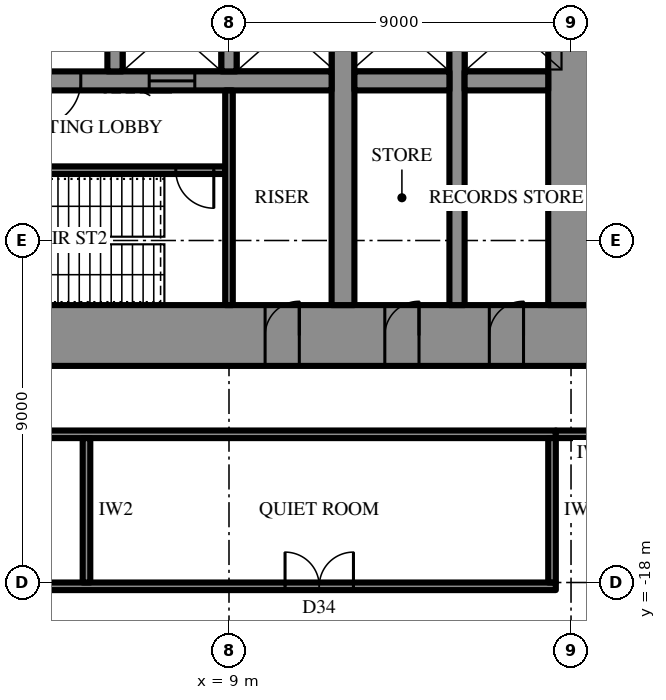
"""IFC4 building model, lengths in metres.
Left out: names, types, materials, properties, quantities, classifications, styles, units other than length and angle.
Written with IfcOpenShell. Run it as: python <this file> out.ifc"""

import sys

from ifc_helpers import new_model, si_unit, direction, frame, frame_2d, origin, place, context, subcontext, project, spatial, rectangle, extrude, element, fill, save


model = new_model("IFC4")
c1 = context("Model", 3, precision=1e-05, world=origin(), true_north=direction((0.0, 1.0)))
c2 = subcontext(c1, "Body", "Model", "MODEL_VIEW")
j1 = project(units=[si_unit("LENGTHUNIT", "METRE"), si_unit("PLANEANGLEUNIT", "RADIAN")], contexts=[c1])
p1 = place(None, origin())
s1 = spatial("IfcSite", under=j1, at=p1, CompositionType="ELEMENT")
p2 = place(p1, origin())
s2 = spatial("IfcBuilding", under=s1, at=p2, CompositionType="ELEMENT")
p3 = place(p2, frame((0.0, 0.0, 27.7)))
s3 = spatial("IfcBuildingStorey", under=s2, at=p3, CompositionType="ELEMENT", Elevation=27.7)
p4 = place(p3, frame((18.6, -11.5, 0.0), z_axis=(0.0, 0.0, 1.0), x_axis=(-1.0, 0.0, 0.0)))
e1 = element("IfcWall", 1, at=p4, inside=s3, PredefinedType="SHEAR", context=c2, shape_type="SweptSolid", body=[
    extrude(rectangle(XDim=37.2, YDim=1.6, at=frame_2d((18.6, 0.0))), origin(), (0.0, 0.0, 1.0), 4.2),
])
p5 = place(p4, frame((19.45, 0.0, 0.0)))
e2 = element("IfcOpeningElement", 2, at=p5, cuts=e1, PredefinedType="OPENING", context=c2, shape_type="SweptSolid", body=[
    extrude(rectangle(XDim=0.9, YDim=2.2, at=frame_2d((0.45, 1.1))), frame((0.0, 0.81, 0.0), z_axis=(0.0, -1.0, 0.0), x_axis=(1.0, 0.0, 0.0)), (0.0, 0.0, 1.0), 1.62),
])
p6 = place(p4, frame((22.45, 0.0, 0.0)))
e3 = element("IfcOpeningElement", 3, at=p6, cuts=e1, PredefinedType="OPENING", context=c2, shape_type="SweptSolid", body=[
    extrude(rectangle(XDim=0.9, YDim=2.2, at=frame_2d((0.45, 1.1))), frame((0.0, 0.81, 0.0), z_axis=(0.0, -1.0, 0.0), x_axis=(1.0, 0.0, 0.0)), (0.0, 0.0, 1.0), 1.62),
])
p7 = place(p4, frame((25.5, 0.0, 0.0)))
e4 = element("IfcOpeningElement", 4, at=p7, cuts=e1, PredefinedType="OPENING", context=c2, shape_type="SweptSolid", body=[
    extrude(rectangle(XDim=1.0, YDim=2.2, at=frame_2d((0.5, 1.1))), frame((0.0, 0.81, 0.0), z_axis=(0.0, -1.0, 0.0), x_axis=(1.0, 0.0, 0.0)), (0.0, 0.0, 1.0), 1.62),
])
p8 = place(p4, frame((1.85, 0.0, 0.0)))
e5 = element("IfcOpeningElement", 5, at=p8, cuts=e1, PredefinedType="OPENING", context=c2, shape_type="SweptSolid", body=[
    extrude(rectangle(XDim=0.9, YDim=2.2, at=frame_2d((0.45, 1.1))), frame((0.0, 0.81, 0.0), z_axis=(0.0, -1.0, 0.0), x_axis=(1.0, 0.0, 0.0)), (0.0, 0.0, 1.0), 1.62),
])
p9 = place(p4, frame((4.6, 0.0, 0.0)))
e6 = element("IfcOpeningElement", 6, at=p9, cuts=e1, PredefinedType="OPENING", context=c2, shape_type="SweptSolid", body=[
    extrude(rectangle(XDim=0.9, YDim=2.2, at=frame_2d((0.45, 1.1))), frame((0.0, 0.81, 0.0), z_axis=(0.0, -1.0, 0.0), x_axis=(1.0, 0.0, 0.0)), (0.0, 0.0, 1.0), 1.62),
])
p10 = place(p4, frame((7.75, 0.0, 0.0)))
e7 = element("IfcOpeningElement", 7, at=p10, cuts=e1, PredefinedType="OPENING", context=c2, shape_type="SweptSolid", body=[
    extrude(rectangle(XDim=0.9, YDim=2.2, at=frame_2d((0.45, 1.1))), frame((0.0, 0.81, 0.0), z_axis=(0.0, -1.0, 0.0), x_axis=(1.0, 0.0, 0.0)), (0.0, 0.0, 1.0), 1.62),
])
p11 = place(p4, frame((28.55, 0.0, 0.0)))
e8 = element("IfcOpeningElement", 8, at=p11, cuts=e1, PredefinedType="OPENING", context=c2, shape_type="SweptSolid", body=[
    extrude(rectangle(XDim=0.9, YDim=2.2, at=frame_2d((0.45, 1.1))), frame((0.0, 0.81, 0.0), z_axis=(0.0, -1.0, 0.0), x_axis=(1.0, 0.0, 0.0)), (0.0, 0.0, 1.0), 1.62),
])
p12 = place(p4, frame((31.7, 0.0, 0.0)))
e9 = element("IfcOpeningElement", 9, at=p12, cuts=e1, PredefinedType="OPENING", context=c2, shape_type="SweptSolid", body=[
    extrude(rectangle(XDim=0.9, YDim=2.2, at=frame_2d((0.45, 1.1))), frame((0.0, 0.81, 0.0), z_axis=(0.0, -1.0, 0.0), x_axis=(1.0, 0.0, 0.0)), (0.0, 0.0, 1.0), 1.62),
])
p13 = place(p4, frame((34.45, 0.0, 0.0)))
e10 = element("IfcOpeningElement", 10, at=p13, cuts=e1, PredefinedType="OPENING", context=c2, shape_type="SweptSolid", body=[
    extrude(rectangle(XDim=0.9, YDim=2.2, at=frame_2d((0.45, 1.1))), frame((0.0, 0.81, 0.0), z_axis=(0.0, -1.0, 0.0), x_axis=(1.0, 0.0, 0.0)), (0.0, 0.0, 1.0), 1.62),
])
p14 = place(p3, frame((18.0, -10.7, 0.0), z_axis=(0.0, 0.0, 1.0), x_axis=(0.0, 1.0, 0.0)))
e11 = element("IfcWall", 11, at=p14, inside=s3, PredefinedType="SHEAR", context=c2, shape_type="SweptSolid", body=[
    extrude(rectangle(XDim=21.4, YDim=1.2, at=frame_2d((10.7, 0.0))), origin(), (0.0, 0.0, 1.0), 4.2),
])
p15 = place(p14, frame((9.8, 0.0, 0.0)))
e12 = element("IfcOpeningElement", 12, at=p15, cuts=e11, PredefinedType="OPENING", context=c2, shape_type="SweptSolid", body=[
    extrude(rectangle(XDim=1.8, YDim=2.4, at=frame_2d((0.9, 1.2))), frame((0.0, 0.61, 0.0), z_axis=(0.0, -1.0, 0.0), x_axis=(1.0, 0.0, 0.0)), (0.0, 0.0, 1.0), 1.22),
])
p16 = place(p3, frame((12.0, -10.7, 0.0), z_axis=(0.0, 0.0, 1.0), x_axis=(0.0, 1.0, 0.0)))
e13 = element("IfcWall", 13, at=p16, inside=s3, PredefinedType="SHEAR", context=c2, shape_type="SweptSolid", body=[
    extrude(rectangle(XDim=21.4, YDim=0.6, at=frame_2d((10.7, 0.0))), origin(), (0.0, 0.0, 1.0), 4.2),
])
p17 = place(p16, frame((9.8, 0.0, 0.0)))
e14 = element("IfcOpeningElement", 14, at=p17, cuts=e13, PredefinedType="OPENING", context=c2, shape_type="SweptSolid", body=[
    extrude(rectangle(XDim=1.8, YDim=2.4, at=frame_2d((0.9, 1.2))), frame((0.0, 0.31, 0.0), z_axis=(0.0, -1.0, 0.0), x_axis=(1.0, 0.0, 0.0)), (0.0, 0.0, 1.0), 0.62),
])
p18 = place(p3, frame((15.0, -10.7, 0.0), z_axis=(0.0, 0.0, 1.0), x_axis=(0.0, 1.0, 0.0)))
e15 = element("IfcWall", 15, at=p18, inside=s3, PredefinedType="SHEAR", context=c2, shape_type="SweptSolid", body=[
    extrude(rectangle(XDim=21.4, YDim=0.4, at=frame_2d((10.7, 0.0))), origin(), (0.0, 0.0, 1.0), 4.2),
])
p19 = place(p18, frame((9.8, 0.0, 0.0)))
e16 = element("IfcOpeningElement", 16, at=p19, cuts=e15, PredefinedType="OPENING", context=c2, shape_type="SweptSolid", body=[
    extrude(rectangle(XDim=1.8, YDim=2.4, at=frame_2d((0.9, 1.2))), frame((0.0, 0.21, 0.0), z_axis=(0.0, -1.0, 0.0), x_axis=(1.0, 0.0, 0.0)), (0.0, 0.0, 1.0), 0.42),
])
p20 = place(p3, frame((17.4, -4.8, 0.0), z_axis=(0.0, 0.0, 1.0), x_axis=(-1.0, 0.0, 0.0)))
e17 = element("IfcWall", 17, at=p20, inside=s3, PredefinedType="SHEAR", context=c2, shape_type="SweptSolid", body=[
    extrude(rectangle(XDim=2.2, YDim=0.5, at=frame_2d((1.1, 0.0))), origin(), (0.0, 0.0, 1.0), 4.2),
])
p21 = place(p3, frame((14.8, -4.8, 0.0), z_axis=(0.0, 0.0, 1.0), x_axis=(-1.0, 0.0, 0.0)))
e18 = element("IfcWall", 18, at=p21, inside=s3, PredefinedType="SHEAR", context=c2, shape_type="SweptSolid", body=[
    extrude(rectangle(XDim=2.5, YDim=0.5, at=frame_2d((1.25, 0.0))), origin(), (0.0, 0.0, 1.0), 4.2),
])
p22 = place(p3, frame((11.7, -4.8, 0.0), z_axis=(0.0, 0.0, 1.0), x_axis=(-1.0, 0.0, 0.0)))
e19 = element("IfcWall", 19, at=p22, inside=s3, PredefinedType="SHEAR", context=c2, shape_type="SweptSolid", body=[
    extrude(rectangle(XDim=23.4, YDim=0.5, at=frame_2d((11.7, 0.0))), origin(), (0.0, 0.0, 1.0), 4.2),
])
p23 = place(p22, frame((6.6, 0.0, 0.0)))
e20 = element("IfcOpeningElement", 20, at=p23, cuts=e19, PredefinedType="OPENING", context=c2, shape_type="SweptSolid", body=[
    extrude(rectangle(XDim=1.2, YDim=2.2, at=frame_2d((0.6, 1.1))), frame((0.0, 0.26, 0.0), z_axis=(0.0, -1.0, 0.0), x_axis=(1.0, 0.0, 0.0)), (0.0, 0.0, 1.0), 0.52),
])
p24 = place(p22, frame((3.6, 0.0, 0.0)))
e21 = element("IfcOpeningElement", 21, at=p24, cuts=e19, PredefinedType="OPENING", context=c2, shape_type="SweptSolid", body=[
    extrude(rectangle(XDim=1.2, YDim=2.2, at=frame_2d((0.6, 1.1))), frame((0.0, 0.26, 0.0), z_axis=(0.0, -1.0, 0.0), x_axis=(1.0, 0.0, 0.0)), (0.0, 0.0, 1.0), 0.52),
])
for number, where, z_axis, x_axis in (
    (22, (9.0, -2.25, 0.0), (0.0, 0.0, 1.0), (0.0, -1.0, 0.0)),
    (23, (6.0, -2.25, 0.0), (0.0, 0.0, 1.0), (0.0, -1.0, 0.0)),
):
    element("IfcWall", number, at=place(p3, frame(where, z_axis=z_axis, x_axis=x_axis)), inside=s3, PredefinedType="SHEAR", context=c2, shape_type="SweptSolid", body=[
        extrude(rectangle(XDim=2.3, YDim=0.4, at=frame_2d((1.15, 0.0))), origin(), (0.0, 0.0, 1.0), 4.2),
    ])
p25 = place(p3, frame((8.9, -7.15, 0.0), z_axis=(0.0, 0.0, 1.0), x_axis=(-1.0, 0.0, 0.0)))
e24 = element("IfcWall", 24, at=p25, inside=s3, PredefinedType="SHEAR", context=c2, shape_type="SweptSolid", body=[
    extrude(rectangle(XDim=8.6, YDim=0.2, at=frame_2d((4.3, 0.0))), origin(), (0.0, 0.0, 1.0), 4.2),
])
p26 = place(p25, frame((0.3, 0.0, 0.0)))
e25 = element("IfcOpeningElement", 25, at=p26, cuts=e24, PredefinedType="OPENING", context=c2, shape_type="SweptSolid", body=[
    extrude(rectangle(XDim=1.0, YDim=2.2, at=frame_2d((0.5, 1.1))), frame((0.0, 0.11, 0.0), z_axis=(0.0, -1.0, 0.0), x_axis=(1.0, 0.0, 0.0)), (0.0, 0.0, 1.0), 0.22),
])
p27 = place(p3, frame((9.0, -5.05, 0.0), z_axis=(0.0, 0.0, 1.0), x_axis=(0.0, -1.0, 0.0)))
e26 = element("IfcWall", 26, at=p27, inside=s3, PredefinedType="PARTITIONING", context=c2, shape_type="SweptSolid", body=[
    extrude(rectangle(XDim=5.65, YDim=0.2, at=frame_2d((2.825, 0.0))), origin(), (0.0, 0.0, 1.0), 4.0),
])
p28 = place(p3, frame((17.6, -14.1, 0.0), z_axis=(0.0, 0.0, 1.0), x_axis=(-1.0, 0.0, 0.0)))
e27 = element("IfcWall", 27, at=p28, inside=s3, PredefinedType="PARTITIONING", context=c2, shape_type="SweptSolid", body=[
    extrude(rectangle(XDim=35.2, YDim=0.2, at=frame_2d((17.6, 0.0))), origin(), (0.0, 0.0, 1.0), 4.0),
])
p29 = place(p3, frame((17.6, -18.1, 0.0), z_axis=(0.0, 0.0, 1.0), x_axis=(-1.0, 0.0, 0.0)))
e28 = element("IfcWall", 28, at=p29, inside=s3, PredefinedType="PARTITIONING", context=c2, shape_type="SweptSolid", body=[
    extrude(rectangle(XDim=35.2, YDim=0.2, at=frame_2d((17.6, 0.0))), origin(), (0.0, 0.0, 1.0), 4.0),
])
p30 = place(p29, frame((5.325, 0.0, 0.0)))
e29 = element("IfcOpeningElement", 29, at=p30, cuts=e28, PredefinedType="OPENING", context=c2, shape_type="SweptSolid", body=[
    extrude(rectangle(XDim=1.8, YDim=2.4, at=frame_2d((0.9, 1.2))), frame((0.0, 0.11, 0.0), z_axis=(0.0, -1.0, 0.0), x_axis=(1.0, 0.0, 0.0)), (0.0, 0.0, 1.0), 0.22),
])
p31 = place(p29, frame((16.225, 0.0, 0.0)))
e30 = element("IfcOpeningElement", 30, at=p31, cuts=e28, PredefinedType="OPENING", context=c2, shape_type="SweptSolid", body=[
    extrude(rectangle(XDim=1.0, YDim=2.2, at=frame_2d((0.5, 1.1))), frame((0.0, 0.11, 0.0), z_axis=(0.0, -1.0, 0.0), x_axis=(1.0, 0.0, 0.0)), (0.0, 0.0, 1.0), 0.22),
])
p32 = place(p29, frame((27.2, 0.0, 0.0)))
e31 = element("IfcOpeningElement", 31, at=p32, cuts=e28, PredefinedType="OPENING", context=c2, shape_type="SweptSolid", body=[
    extrude(rectangle(XDim=1.8, YDim=2.4, at=frame_2d((0.9, 1.2))), frame((0.0, 0.11, 0.0), z_axis=(0.0, -1.0, 0.0), x_axis=(1.0, 0.0, 0.0)), (0.0, 0.0, 1.0), 0.22),
])
p33 = place(p3, frame((17.5, -14.2, 0.0), z_axis=(0.0, 0.0, 1.0), x_axis=(0.0, -1.0, 0.0)))
e32 = element("IfcWall", 32, at=p33, inside=s3, PredefinedType="PARTITIONING", context=c2, shape_type="SweptSolid", body=[
    extrude(rectangle(XDim=3.8, YDim=0.2, at=frame_2d((1.9, 0.0))), origin(), (0.0, 0.0, 1.0), 4.0),
])
p34 = place(p3, frame((5.25, -14.2, 0.0), z_axis=(0.0, 0.0, 1.0), x_axis=(0.0, -1.0, 0.0)))
e33 = element("IfcWall", 33, at=p34, inside=s3, PredefinedType="PARTITIONING", context=c2, shape_type="SweptSolid", body=[
    extrude(rectangle(XDim=3.8, YDim=0.2, at=frame_2d((1.9, 0.0))), origin(), (0.0, 0.0, 1.0), 2.944),
])
p35 = place(p3, frame((19.6, -14.1, 0.0), z_axis=(0.0, 0.0, 1.0), x_axis=(-1.0, 0.0, 0.0)))
e34 = element("IfcWall", 34, at=p35, inside=s3, PredefinedType="PARTITIONING", context=c2, shape_type="SweptSolid", body=[
    extrude(rectangle(XDim=2.0, YDim=0.2, at=frame_2d((1.0, 0.0))), origin(), (0.0, 0.0, 1.0), 4.0),
])
p36 = place(p23, origin())
e35 = element("IfcDoor", 35, at=p36, inside=s3, OperationType="SINGLE_SWING_LEFT", PredefinedType="DOOR", context=c2, shape_type="SweptSolid", body=[
    extrude(rectangle(XDim=1.2, YDim=2.2, at=frame_2d((0.6, 1.1))), frame((0.0, 0.025, 0.0), z_axis=(0.0, -1.0, 0.0), x_axis=(1.0, 0.0, 0.0)), (0.0, 0.0, 1.0), 0.05),
])
fill(e20, e35)
p37 = place(p26, origin())
e36 = element("IfcDoor", 36, at=p37, inside=s3, OperationType="SINGLE_SWING_RIGHT", PredefinedType="DOOR", context=c2, shape_type="SweptSolid", body=[
    extrude(rectangle(XDim=1.0, YDim=2.2, at=frame_2d((0.5, 1.1))), frame((0.0, 0.025, 0.0), z_axis=(0.0, -1.0, 0.0), x_axis=(1.0, 0.0, 0.0)), (0.0, 0.0, 1.0), 0.05),
])
fill(e25, e36)
p38 = place(p8, frame((0.9, 0.0, 0.0), z_axis=(0.0, 0.0, 1.0), x_axis=(-1.0, 0.0, 0.0)))
e37 = element("IfcDoor", 37, at=p38, inside=s3, OperationType="SINGLE_SWING_LEFT", PredefinedType="DOOR", context=c2, shape_type="SweptSolid", body=[
    extrude(rectangle(XDim=0.9, YDim=2.2, at=frame_2d((0.45, 1.1))), frame((0.0, 0.025, 0.0), z_axis=(0.0, -1.0, 0.0), x_axis=(1.0, 0.0, 0.0)), (0.0, 0.0, 1.0), 0.05),
])
fill(e5, e37)
p39 = place(p9, frame((0.9, 0.0, 0.0), z_axis=(0.0, 0.0, 1.0), x_axis=(-1.0, 0.0, 0.0)))
e38 = element("IfcDoor", 38, at=p39, inside=s3, OperationType="SINGLE_SWING_LEFT", PredefinedType="DOOR", context=c2, shape_type="SweptSolid", body=[
    extrude(rectangle(XDim=0.9, YDim=2.2, at=frame_2d((0.45, 1.1))), frame((0.0, 0.025, 0.0), z_axis=(0.0, -1.0, 0.0), x_axis=(1.0, 0.0, 0.0)), (0.0, 0.0, 1.0), 0.05),
])
fill(e6, e38)
p40 = place(p10, frame((0.9, 0.0, 0.0), z_axis=(0.0, 0.0, 1.0), x_axis=(-1.0, 0.0, 0.0)))
e39 = element("IfcDoor", 39, at=p40, inside=s3, OperationType="SINGLE_SWING_LEFT", PredefinedType="DOOR", context=c2, shape_type="SweptSolid", body=[
    extrude(rectangle(XDim=0.9, YDim=2.2, at=frame_2d((0.45, 1.1))), frame((0.0, 0.025, 0.0), z_axis=(0.0, -1.0, 0.0), x_axis=(1.0, 0.0, 0.0)), (0.0, 0.0, 1.0), 0.05),
])
fill(e7, e39)
p41 = place(p24, origin())
e40 = element("IfcDoor", 40, at=p41, inside=s3, OperationType="SLIDING_TO_LEFT", PredefinedType="DOOR", context=c2, shape_type="SweptSolid", body=[
    extrude(rectangle(XDim=1.2, YDim=2.2, at=frame_2d((0.6, 1.1))), frame((0.0, 0.025, 0.0), z_axis=(0.0, -1.0, 0.0), x_axis=(1.0, 0.0, 0.0)), (0.0, 0.0, 1.0), 0.05),
])
fill(e21, e40)
p42 = place(p30, frame((1.8, 0.0, 0.0), z_axis=(0.0, 0.0, 1.0), x_axis=(-1.0, 0.0, 0.0)))
e41 = element("IfcDoor", 41, at=p42, inside=s3, OperationType="DOUBLE_DOOR_SINGLE_SWING", PredefinedType="DOOR", context=c2, shape_type="SweptSolid", body=[
    extrude(rectangle(XDim=1.8, YDim=2.4, at=frame_2d((0.9, 1.2))), frame((0.0, 0.025, 0.0), z_axis=(0.0, -1.0, 0.0), x_axis=(1.0, 0.0, 0.0)), (0.0, 0.0, 1.0), 0.05),
])
fill(e29, e41)
save(model, sys.argv[1])
